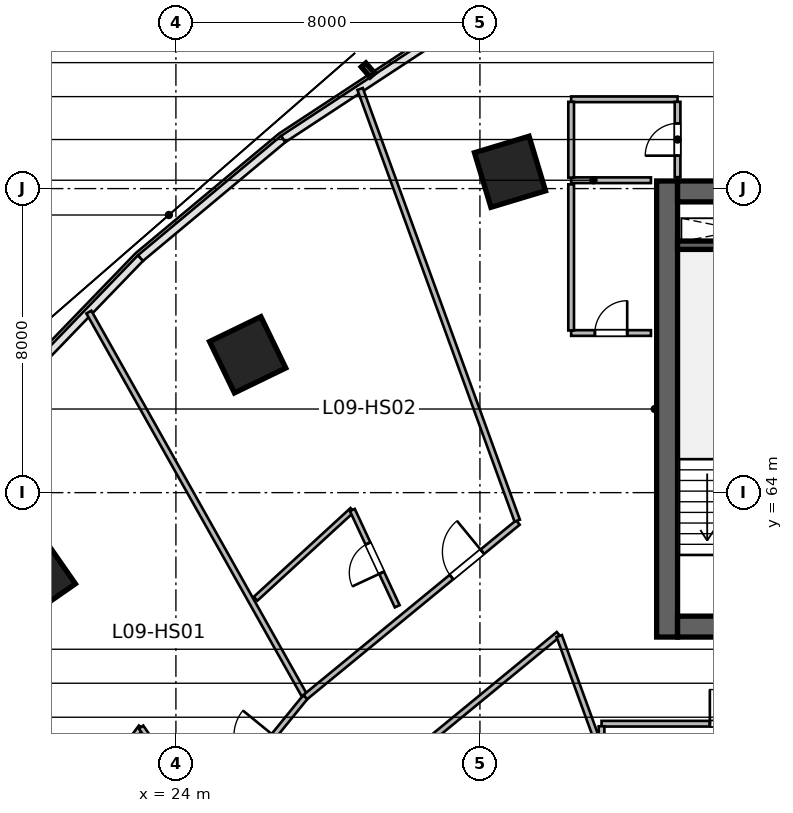
"""IFC4 building model, lengths in metres.
Left out: names, types, materials, properties, quantities, classifications, styles, units other than length and angle.
Written with IfcOpenShell. Run it as: python <this file> out.ifc"""

import sys

from ifc_helpers import new_model, si_unit, direction, frame, frame_2d, origin, origin_2d, place, context, subcontext, project, spatial, rectangle, extrude, source, transform, mapped, element, fill, save


model = new_model("IFC4")
c1 = context("Model", 3, precision=1e-05, world=origin(), true_north=direction((0.0, 1.0)))
c2 = subcontext(c1, "Body", "Model", "MODEL_VIEW")
j1 = project(units=[si_unit("LENGTHUNIT", "METRE"), si_unit("PLANEANGLEUNIT", "RADIAN")], contexts=[c1])
p1 = place(None, origin())
s1 = spatial("IfcSite", under=j1, at=p1, CompositionType="ELEMENT")
p2 = place(p1, origin())
s2 = spatial("IfcBuilding", under=s1, at=p2, CompositionType="ELEMENT")
p3 = place(p2, frame((0.0, 0.0, 46.2)))
s3 = spatial("IfcBuildingStorey", under=s2, at=p3, CompositionType="ELEMENT", Elevation=46.2)
m1 = source(origin(), c2, "Body", "SweptSolid", [
    extrude(rectangle(XDim=12.0, YDim=0.55, at=frame_2d((6.0, 0.0))), origin(), (0.0, 0.0, 1.0), 3.6),
])
p4 = place(p3, frame((36.925, 60.2, 0.0), z_axis=(0.0, 0.0, 1.0), x_axis=(0.0, 1.0, 0.0)))
e1 = element("IfcWall", 1, at=p4, inside=s3, PredefinedType="SHEAR", context=c2, shape_type="MappedRepresentation", body=[
    mapped(m1, transform((0.0, 0.0, 0.0), scale=1.0)),
])
m2 = source(origin(), c2, "Body", "SweptSolid", [
    extrude(rectangle(XDim=21.6, YDim=0.55, at=frame_2d((10.8, 0.0))), origin(), (0.0, 0.0, 1.0), 3.6),
])
p5 = place(p3, frame((37.2, 60.475, 0.0), z_axis=(0.0, 0.0, 1.0), x_axis=(1.0, 0.0, 0.0)))
e2 = element("IfcWall", 2, at=p5, inside=s3, PredefinedType="SHEAR", context=c2, shape_type="MappedRepresentation", body=[
    mapped(m2, transform((0.0, 0.0, 0.0), scale=1.0)),
])
p6 = place(p5, frame((1.1, 0.0, 0.0)))
e3 = element("IfcOpeningElement", 3, at=p6, cuts=e2, PredefinedType="OPENING", context=c2, shape_type="SweptSolid", body=[
    extrude(rectangle(XDim=1.15, YDim=2.15, at=frame_2d((0.575, 1.075))), frame((0.0, 0.285, 0.0), z_axis=(0.0, -1.0, 0.0), x_axis=(1.0, 0.0, 0.0)), (0.0, 0.0, 1.0), 0.57),
])
p7 = place(p5, frame((19.5, 0.0, 0.0)))
e4 = element("IfcOpeningElement", 4, at=p7, cuts=e2, PredefinedType="OPENING", context=c2, shape_type="SweptSolid", body=[
    extrude(rectangle(XDim=0.9, YDim=2.1, at=frame_2d((0.45, 1.05))), frame((0.0, 0.285, 0.0), z_axis=(0.0, -1.0, 0.0), x_axis=(1.0, 0.0, 0.0)), (0.0, 0.0, 1.0), 0.57),
])
p8 = place(p5, frame((12.02, 0.0, 0.0)))
e5 = element("IfcOpeningElement", 5, at=p8, cuts=e2, PredefinedType="OPENING", context=c2, shape_type="SweptSolid", body=[
    extrude(rectangle(XDim=1.6, YDim=2.15, at=frame_2d((0.8, 1.075))), frame((0.0, 0.285, 0.0), z_axis=(0.0, -1.0, 0.0), x_axis=(1.0, 0.0, 0.0)), (0.0, 0.0, 1.0), 0.57),
])
p9 = place(p3, frame((37.2, 71.925, 0.0), z_axis=(0.0, 0.0, 1.0), x_axis=(1.0, 0.0, 0.0)))
e6 = element("IfcWall", 6, at=p9, inside=s3, PredefinedType="SHEAR", context=c2, shape_type="MappedRepresentation", body=[
    mapped(m2, transform((0.0, 0.0, 0.0), scale=1.0)),
])
p10 = place(p9, frame((1.2, 0.0, 0.0)))
e7 = element("IfcOpeningElement", 7, at=p10, cuts=e6, PredefinedType="OPENING", context=c2, shape_type="SweptSolid", body=[
    extrude(rectangle(XDim=0.9, YDim=2.1, at=frame_2d((0.45, 1.05))), frame((0.0, 0.285, 0.0), z_axis=(0.0, -1.0, 0.0), x_axis=(1.0, 0.0, 0.0)), (0.0, 0.0, 1.0), 0.57),
])
p11 = place(p9, frame((14.7, 0.0, 0.0)))
e8 = element("IfcOpeningElement", 8, at=p11, cuts=e6, PredefinedType="OPENING", context=c2, shape_type="SweptSolid", body=[
    extrude(rectangle(XDim=1.2, YDim=2.15, at=frame_2d((0.6, 1.075))), frame((0.0, 0.285, 0.0), z_axis=(0.0, -1.0, 0.0), x_axis=(1.0, 0.0, 0.0)), (0.0, 0.0, 1.0), 0.57),
])
p12 = place(p9, frame((4.15, 0.0, 0.0)))
e9 = element("IfcOpeningElement", 9, at=p12, cuts=e6, PredefinedType="OPENING", context=c2, shape_type="SweptSolid", body=[
    extrude(rectangle(XDim=1.3, YDim=2.15, at=frame_2d((0.65, 1.075))), frame((0.0, 0.285, 0.0), z_axis=(0.0, -1.0, 0.0), x_axis=(1.0, 0.0, 0.0)), (0.0, 0.0, 1.0), 0.57),
])
p13 = place(p9, frame((7.25, 0.0, 0.0)))
e10 = element("IfcOpeningElement", 10, at=p13, cuts=e6, PredefinedType="OPENING", context=c2, shape_type="SweptSolid", body=[
    extrude(rectangle(XDim=0.9, YDim=2.1, at=frame_2d((0.45, 1.05))), frame((0.0, 0.285, 0.0), z_axis=(0.0, -1.0, 0.0), x_axis=(1.0, 0.0, 0.0)), (0.0, 0.0, 1.0), 0.57),
])
p14 = place(p9, frame((10.95, 0.0, 0.0)))
e11 = element("IfcOpeningElement", 11, at=p14, cuts=e6, PredefinedType="OPENING", context=c2, shape_type="SweptSolid", body=[
    extrude(rectangle(XDim=0.9, YDim=2.1, at=frame_2d((0.45, 1.05))), frame((0.0, 0.285, 0.0), z_axis=(0.0, -1.0, 0.0), x_axis=(1.0, 0.0, 0.0)), (0.0, 0.0, 1.0), 0.57),
])
m3 = source(origin(), c2, "Body", "SweptSolid", [
    extrude(rectangle(XDim=3.27, YDim=0.22, at=frame_2d((1.635, 0.0))), origin(), (0.0, 0.0, 1.0), 3.6),
])
p15 = place(p3, frame((37.2, 70.51, 0.0), z_axis=(0.0, 0.0, 1.0), x_axis=(1.0, 0.0, 0.0)))
e12 = element("IfcWall", 12, at=p15, inside=s3, PredefinedType="SHEAR", context=c2, shape_type="MappedRepresentation", body=[
    mapped(m3, transform((0.0, 0.0, 0.0), scale=1.0)),
])
m4 = source(origin(), c2, "Body", "SweptSolid", [
    extrude(rectangle(XDim=1.5, YDim=1.5, at=origin_2d()), origin(), (0.0, 0.0, 1.0), 3.6),
])
for number, where, z_axis, x_axis in (
    (13, (20.311, 61.789, 0.0), (0.0, 0.0, 1.0), (-0.571, 0.821, 0.0)),
    (14, (25.888, 67.627, 0.0), (0.0, 0.0, 1.0), (-0.436, 0.9, 0.0)),
    (15, (32.791, 72.442, 0.0), (0.0, 0.0, 1.0), (-0.289, 0.957, 0.0)),
):
    element("IfcColumn", number, at=place(p3, frame(where, z_axis=z_axis, x_axis=x_axis)), inside=s3, PredefinedType="COLUMN", context=c2, shape_type="MappedRepresentation", body=[
        mapped(m4, transform((0.0, 0.0, 0.0), scale=1.0)),
    ])
m5 = source(origin(), c2, "Body", "SweptSolid", [
    extrude(rectangle(XDim=2.1, YDim=0.15, at=frame_2d((1.05, 0.0))), origin(), (0.0, 0.0, 1.0), 3.36),
])
p16 = place(p3, frame((34.4, 72.22, 0.0), z_axis=(0.0, 0.0, 1.0), x_axis=(1.0, 0.0, 0.0)))
e16 = element("IfcWall", 16, at=p16, inside=s3, PredefinedType="PARTITIONING", context=c2, shape_type="MappedRepresentation", body=[
    mapped(m5, transform((0.0, 0.0, 0.0), scale=1.0)),
])
m6 = source(origin(), c2, "Body", "SweptSolid", [
    extrude(rectangle(XDim=2.8, YDim=0.15, at=frame_2d((1.4, 0.0))), origin(), (0.0, 0.0, 1.0), 3.36),
])
p17 = place(p3, frame((34.4, 74.35, 0.0), z_axis=(0.0, 0.0, 1.0), x_axis=(1.0, 0.0, 0.0)))
e17 = element("IfcWall", 17, at=p17, inside=s3, PredefinedType="PARTITIONING", context=c2, shape_type="MappedRepresentation", body=[
    mapped(m6, transform((0.0, 0.0, 0.0), scale=1.0)),
])
m7 = source(origin(), c2, "Body", "SweptSolid", [
    extrude(rectangle(XDim=1.995, YDim=0.15, at=frame_2d((0.998, 0.0))), origin(), (0.0, 0.0, 1.0), 3.36),
])
p18 = place(p3, frame((34.4, 72.288, 0.0), z_axis=(0.0, 0.0, 1.0), x_axis=(0.0, 1.0, 0.0)))
e18 = element("IfcWall", 18, at=p18, inside=s3, PredefinedType="PARTITIONING", context=c2, shape_type="MappedRepresentation", body=[
    mapped(m7, transform((0.0, 0.0, 0.0), scale=1.0)),
])
m8 = source(origin(), c2, "Body", "SweptSolid", [
    extrude(rectangle(XDim=1.982, YDim=0.15, at=frame_2d((0.991, 0.0))), origin(), (0.0, 0.0, 1.0), 3.36),
])
p19 = place(p3, frame((37.2, 72.3, 0.0), z_axis=(0.0, 0.0, 1.0), x_axis=(0.0, 1.0, 0.0)))
e19 = element("IfcWall", 19, at=p19, inside=s3, PredefinedType="PARTITIONING", context=c2, shape_type="MappedRepresentation", body=[
    mapped(m8, transform((0.0, 0.0, 0.0), scale=1.0)),
])
p20 = place(p19, frame((0.566, 0.0, 0.0)))
e20 = element("IfcOpeningElement", 20, at=p20, cuts=e19, PredefinedType="OPENING", context=c2, shape_type="SweptSolid", body=[
    extrude(rectangle(XDim=0.85, YDim=2.1, at=frame_2d((0.425, 1.05))), frame((0.0, 0.085, 0.0), z_axis=(0.0, -1.0, 0.0), x_axis=(1.0, 0.0, 0.0)), (0.0, 0.0, 1.0), 0.17),
])
p21 = place(p3, frame((34.4, 68.2, 0.0), z_axis=(0.0, 0.0, 1.0), x_axis=(1.0, 0.0, 0.0)))
e21 = element("IfcWall", 21, at=p21, inside=s3, PredefinedType="PARTITIONING", context=c2, shape_type="MappedRepresentation", body=[
    mapped(m5, transform((0.0, 0.0, 0.0), scale=1.0)),
])
p22 = place(p21, frame((0.625, 0.0, 0.0)))
e22 = element("IfcOpeningElement", 22, at=p22, cuts=e21, PredefinedType="OPENING", context=c2, shape_type="SweptSolid", body=[
    extrude(rectangle(XDim=0.85, YDim=2.1, at=frame_2d((0.425, 1.05))), frame((0.0, 0.085, 0.0), z_axis=(0.0, -1.0, 0.0), x_axis=(1.0, 0.0, 0.0)), (0.0, 0.0, 1.0), 0.17),
])
m9 = source(origin(), c2, "Body", "SweptSolid", [
    extrude(rectangle(XDim=3.845, YDim=0.15, at=frame_2d((1.922, 0.0))), origin(), (0.0, 0.0, 1.0), 3.36),
])
p23 = place(p3, frame((34.4, 68.268, 0.0), z_axis=(0.0, 0.0, 1.0), x_axis=(0.0, 1.0, 0.0)))
e23 = element("IfcWall", 23, at=p23, inside=s3, PredefinedType="PARTITIONING", context=c2, shape_type="MappedRepresentation", body=[
    mapped(m9, transform((0.0, 0.0, 0.0), scale=1.0)),
])
m10 = source(origin(), c2, "Body", "SweptSolid", [
    extrude(rectangle(XDim=6.6, YDim=0.15, at=frame_2d((3.3, 0.0))), origin(), (0.0, 0.0, 1.0), 3.36),
])
p24 = place(p3, frame((35.2, 57.92, 0.0), z_axis=(0.0, 0.0, 1.0), x_axis=(1.0, 0.0, 0.0)))
e24 = element("IfcWall", 24, at=p24, inside=s3, PredefinedType="PARTITIONING", context=c2, shape_type="MappedRepresentation", body=[
    mapped(m10, transform((0.0, 0.0, 0.0), scale=1.0)),
])
p25 = place(p24, frame((2.85, 0.0, 0.0)))
e25 = element("IfcOpeningElement", 25, at=p25, cuts=e24, PredefinedType="OPENING", context=c2, shape_type="SweptSolid", body=[
    extrude(rectangle(XDim=0.9, YDim=2.1, at=frame_2d((0.45, 1.05))), frame((0.0, 0.085, 0.0), z_axis=(0.0, -1.0, 0.0), x_axis=(1.0, 0.0, 0.0)), (0.0, 0.0, 1.0), 0.17),
])
m11 = source(origin(), c2, "Body", "SweptSolid", [
    extrude(rectangle(XDim=3.785, YDim=0.15, at=frame_2d((1.893, 0.0))), origin(), (0.0, 0.0, 1.0), 3.36),
])
p26 = place(p3, frame((35.2, 54.067, 0.0), z_axis=(0.0, 0.0, 1.0), x_axis=(0.0, 1.0, 0.0)))
e26 = element("IfcWall", 26, at=p26, inside=s3, PredefinedType="PARTITIONING", context=c2, shape_type="MappedRepresentation", body=[
    mapped(m11, transform((0.0, 0.0, 0.0), scale=1.0)),
])
m12 = source(origin(), c2, "Body", "SweptSolid", [
    extrude(rectangle(XDim=7.659, YDim=0.15, at=frame_2d((3.829, 0.0))), origin(), (0.0, 0.0, 1.0), 3.36),
])
p27 = place(p3, frame((22.57, 52.683, 0.0), z_axis=(0.0, 0.0, 1.0), x_axis=(0.631489868862, 0.775384127723, 0.0)))
e27 = element("IfcWall", 27, at=p27, inside=s3, PredefinedType="PARTITIONING", context=c2, shape_type="MappedRepresentation", body=[
    mapped(m12, transform((0.0, 0.0, 0.0), scale=1.0)),
])
p28 = place(p27, frame((5.295, 0.0, 0.0)))
e28 = element("IfcOpeningElement", 28, at=p28, cuts=e27, PredefinedType="OPENING", context=c2, shape_type="SweptSolid", body=[
    extrude(rectangle(XDim=1.05, YDim=2.15, at=frame_2d((0.525, 1.075))), frame((0.0, 0.085, 0.0), z_axis=(0.0, -1.0, 0.0), x_axis=(1.0, 0.0, 0.0)), (0.0, 0.0, 1.0), 0.17),
])
m13 = source(origin(), c2, "Body", "SweptSolid", [
    extrude(rectangle(XDim=10.975, YDim=0.15, at=frame_2d((5.487, 0.0))), origin(), (0.0, 0.0, 1.0), 3.36),
])
p29 = place(p3, frame((22.54, 52.719, 0.0), z_axis=(0.0, 0.0, 1.0), x_axis=(-0.638125265812, 0.769932558821, 0.0)))
e29 = element("IfcWall", 29, at=p29, inside=s3, PredefinedType="PARTITIONING", context=c2, shape_type="MappedRepresentation", body=[
    mapped(m13, transform((0.0, 0.0, 0.0), scale=1.0)),
])
m14 = source(origin(), c2, "Body", "SweptSolid", [
    extrude(rectangle(XDim=11.573, YDim=0.15, at=frame_2d((5.786, 0.0))), origin(), (0.0, 0.0, 1.0), 3.36),
])
p30 = place(p3, frame((27.382, 58.664, 0.0), z_axis=(0.0, 0.0, 1.0), x_axis=(-0.490161073951, 0.871631872744, 0.0)))
e30 = element("IfcWall", 30, at=p30, inside=s3, PredefinedType="PARTITIONING", context=c2, shape_type="MappedRepresentation", body=[
    mapped(m14, transform((0.0, 0.0, 0.0), scale=1.0)),
])
m15 = source(origin(), c2, "Body", "SweptSolid", [
    extrude(rectangle(XDim=3.656, YDim=0.14, at=frame_2d((1.828, 0.0))), origin(), (0.0, 0.0, 1.0), 3.36),
])
p31 = place(p3, frame((20.915, 54.886, 0.0), z_axis=(0.0, 0.0, 1.0), x_axis=(0.592700141555, 0.805423206892, 0.0)))
e31 = element("IfcWall", 31, at=p31, inside=s3, PredefinedType="PARTITIONING", context=c2, shape_type="MappedRepresentation", body=[
    mapped(m15, transform((0.0, 0.0, 0.0), scale=1.0)),
])
m16 = source(origin(), c2, "Body", "SweptSolid", [
    extrude(rectangle(XDim=2.663, YDim=0.14, at=frame_2d((1.332, 0.0))), origin(), (0.0, 0.0, 1.0), 2.644),
])
p32 = place(p3, frame((24.603, 55.645, 0.0), z_axis=(0.0, 0.0, 1.0), x_axis=(-0.570905989724, 0.821015438891, 0.0)))
e32 = element("IfcWall", 32, at=p32, inside=s3, PredefinedType="PARTITIONING", context=c2, shape_type="MappedRepresentation", body=[
    mapped(m16, transform((0.0, 0.0, 0.0), scale=1.0)),
])
p33 = place(p32, frame((0.906, 0.0, 0.0)))
e33 = element("IfcOpeningElement", 33, at=p33, cuts=e32, PredefinedType="OPENING", context=c2, shape_type="SweptSolid", body=[
    extrude(rectangle(XDim=0.85, YDim=2.05, at=frame_2d((0.425, 1.025))), frame((0.0, 0.08, 0.0), z_axis=(0.0, -1.0, 0.0), x_axis=(1.0, 0.0, 0.0)), (0.0, 0.0, 1.0), 0.16),
])
m17 = source(origin(), c2, "Body", "SweptSolid", [
    extrude(rectangle(XDim=7.237, YDim=0.15, at=frame_2d((3.618, 0.0))), origin(), (0.0, 0.0, 1.0), 3.36),
])
p34 = place(p3, frame((27.406, 58.621, 0.0), z_axis=(0.0, 0.0, 1.0), x_axis=(0.772813707793, 0.634632943557, 0.0)))
e34 = element("IfcWall", 34, at=p34, inside=s3, PredefinedType="PARTITIONING", context=c2, shape_type="MappedRepresentation", body=[
    mapped(m17, transform((0.0, 0.0, 0.0), scale=1.0)),
])
p35 = place(p34, frame((4.975, 0.0, 0.0)))
e35 = element("IfcOpeningElement", 35, at=p35, cuts=e34, PredefinedType="OPENING", context=c2, shape_type="SweptSolid", body=[
    extrude(rectangle(XDim=1.05, YDim=2.15, at=frame_2d((0.525, 1.075))), frame((0.0, 0.085, 0.0), z_axis=(0.0, -1.0, 0.0), x_axis=(1.0, 0.0, 0.0)), (0.0, 0.0, 1.0), 0.17),
])
m18 = source(origin(), c2, "Body", "SweptSolid", [
    extrude(rectangle(XDim=12.088, YDim=0.15, at=frame_2d((6.044, 0.0))), origin(), (0.0, 0.0, 1.0), 3.36),
])
p36 = place(p3, frame((32.981, 63.262, 0.0), z_axis=(0.0, 0.0, 1.0), x_axis=(-0.34203007529, 0.939689005787, 0.0)))
e36 = element("IfcWall", 36, at=p36, inside=s3, PredefinedType="PARTITIONING", context=c2, shape_type="MappedRepresentation", body=[
    mapped(m18, transform((0.0, 0.0, 0.0), scale=1.0)),
])
m19 = source(origin(), c2, "Body", "SweptSolid", [
    extrude(rectangle(XDim=3.456, YDim=0.14, at=frame_2d((1.728, 0.0))), origin(), (0.0, 0.0, 1.0), 3.36),
])
p37 = place(p3, frame((26.095, 61.207, 0.0), z_axis=(0.0, 0.0, 1.0), x_axis=(0.736860870293, 0.676044420013, 0.0)))
e37 = element("IfcWall", 37, at=p37, inside=s3, PredefinedType="PARTITIONING", context=c2, shape_type="MappedRepresentation", body=[
    mapped(m19, transform((0.0, 0.0, 0.0), scale=1.0)),
])
m20 = source(origin(), c2, "Body", "SweptSolid", [
    extrude(rectangle(XDim=2.796, YDim=0.14, at=frame_2d((1.398, 0.0))), origin(), (0.0, 0.0, 1.0), 3.36),
])
p38 = place(p3, frame((29.823, 61.009, 0.0), z_axis=(0.0, 0.0, 1.0), x_axis=(-0.422316594955, 0.906448395456, 0.0)))
e38 = element("IfcWall", 38, at=p38, inside=s3, PredefinedType="PARTITIONING", context=c2, shape_type="MappedRepresentation", body=[
    mapped(m20, transform((0.0, 0.0, 0.0), scale=1.0)),
])
p39 = place(p38, frame((0.973, 0.0, 0.0)))
e39 = element("IfcOpeningElement", 39, at=p39, cuts=e38, PredefinedType="OPENING", context=c2, shape_type="SweptSolid", body=[
    extrude(rectangle(XDim=0.85, YDim=2.05, at=frame_2d((0.425, 1.025))), frame((0.0, 0.08, 0.0), z_axis=(0.0, -1.0, 0.0), x_axis=(1.0, 0.0, 0.0)), (0.0, 0.0, 1.0), 0.16),
])
m21 = source(origin(), c2, "Body", "SweptSolid", [
    extrude(rectangle(XDim=6.721, YDim=0.15, at=frame_2d((3.361, 0.0))), origin(), (0.0, 0.0, 1.0), 3.36),
])
p40 = place(p3, frame((28.874, 56.01, 0.0), z_axis=(0.0, 0.0, 1.0), x_axis=(0.772828051199, 0.63461547671, 0.0)))
e40 = element("IfcWall", 40, at=p40, inside=s3, PredefinedType="PARTITIONING", context=c2, shape_type="MappedRepresentation", body=[
    mapped(m21, transform((0.0, 0.0, 0.0), scale=1.0)),
])
m22 = source(origin(), c2, "Body", "SweptSolid", [
    extrude(rectangle(XDim=12.196, YDim=0.15, at=frame_2d((6.098, 0.0))), origin(), (0.0, 0.0, 1.0), 3.36),
])
p41 = place(p3, frame((38.258, 48.766, 0.0), z_axis=(0.0, 0.0, 1.0), x_axis=(-0.342022711534, 0.939691686031, 0.0)))
e41 = element("IfcWall", 41, at=p41, inside=s3, PredefinedType="PARTITIONING", context=c2, shape_type="MappedRepresentation", body=[
    mapped(m22, transform((0.0, 0.0, 0.0), scale=1.0)),
])
m23 = source(origin(), c2, "Body", "SweptSolid", [
    extrude(rectangle(XDim=0.85, YDim=2.1, at=frame_2d((0.425, 1.05))), frame((0.0, 0.025, 0.0), z_axis=(0.0, -1.0, 0.0), x_axis=(1.0, 0.0, 0.0)), (0.0, 0.0, 1.0), 0.05),
])
p42 = place(p20, origin())
e42 = element("IfcDoor", 42, at=p42, inside=s3, OperationType="SINGLE_SWING_LEFT", PredefinedType="DOOR", context=c2, shape_type="MappedRepresentation", body=[
    mapped(m23, transform((0.0, 0.0, 0.0), scale=1.0)),
])
fill(e20, e42)
p43 = place(p22, origin())
e43 = element("IfcDoor", 43, at=p43, inside=s3, OperationType="SINGLE_SWING_RIGHT", PredefinedType="DOOR", context=c2, shape_type="MappedRepresentation", body=[
    mapped(m23, transform((0.0, 0.0, 0.0), scale=1.0)),
])
fill(e22, e43)
m24 = source(origin(), c2, "Body", "SweptSolid", [
    extrude(rectangle(XDim=0.9, YDim=2.1, at=frame_2d((0.45, 1.05))), frame((0.0, 0.025, 0.0), z_axis=(0.0, -1.0, 0.0), x_axis=(1.0, 0.0, 0.0)), (0.0, 0.0, 1.0), 0.05),
])
p44 = place(p25, origin())
e44 = element("IfcDoor", 44, at=p44, inside=s3, OperationType="SINGLE_SWING_LEFT", PredefinedType="DOOR", context=c2, shape_type="MappedRepresentation", body=[
    mapped(m24, transform((0.0, 0.0, 0.0), scale=1.0)),
])
fill(e25, e44)
m25 = source(origin(), c2, "Body", "SweptSolid", [
    extrude(rectangle(XDim=1.05, YDim=2.15, at=frame_2d((0.525, 1.075))), frame((0.0, 0.025, 0.0), z_axis=(0.0, -1.0, 0.0), x_axis=(1.0, 0.0, 0.0)), (0.0, 0.0, 1.0), 0.05),
])
p45 = place(p35, origin())
e45 = element("IfcDoor", 45, at=p45, inside=s3, OperationType="SINGLE_SWING_RIGHT", PredefinedType="DOOR", context=c2, shape_type="MappedRepresentation", body=[
    mapped(m25, transform((0.0, 0.0, 0.0), scale=1.0)),
])
fill(e35, e45)
m26 = source(origin(), c2, "Body", "SweptSolid", [
    extrude(rectangle(XDim=0.85, YDim=2.05, at=frame_2d((0.425, 1.025))), frame((0.0, 0.025, 0.0), z_axis=(0.0, -1.0, 0.0), x_axis=(1.0, 0.0, 0.0)), (0.0, 0.0, 1.0), 0.05),
])
p46 = place(p39, origin())
e46 = element("IfcDoor", 46, at=p46, inside=s3, OperationType="SINGLE_SWING_LEFT", PredefinedType="DOOR", context=c2, shape_type="MappedRepresentation", body=[
    mapped(m26, transform((0.0, 0.0, 0.0), scale=1.0)),
])
fill(e39, e46)
save(model, sys.argv[1])
